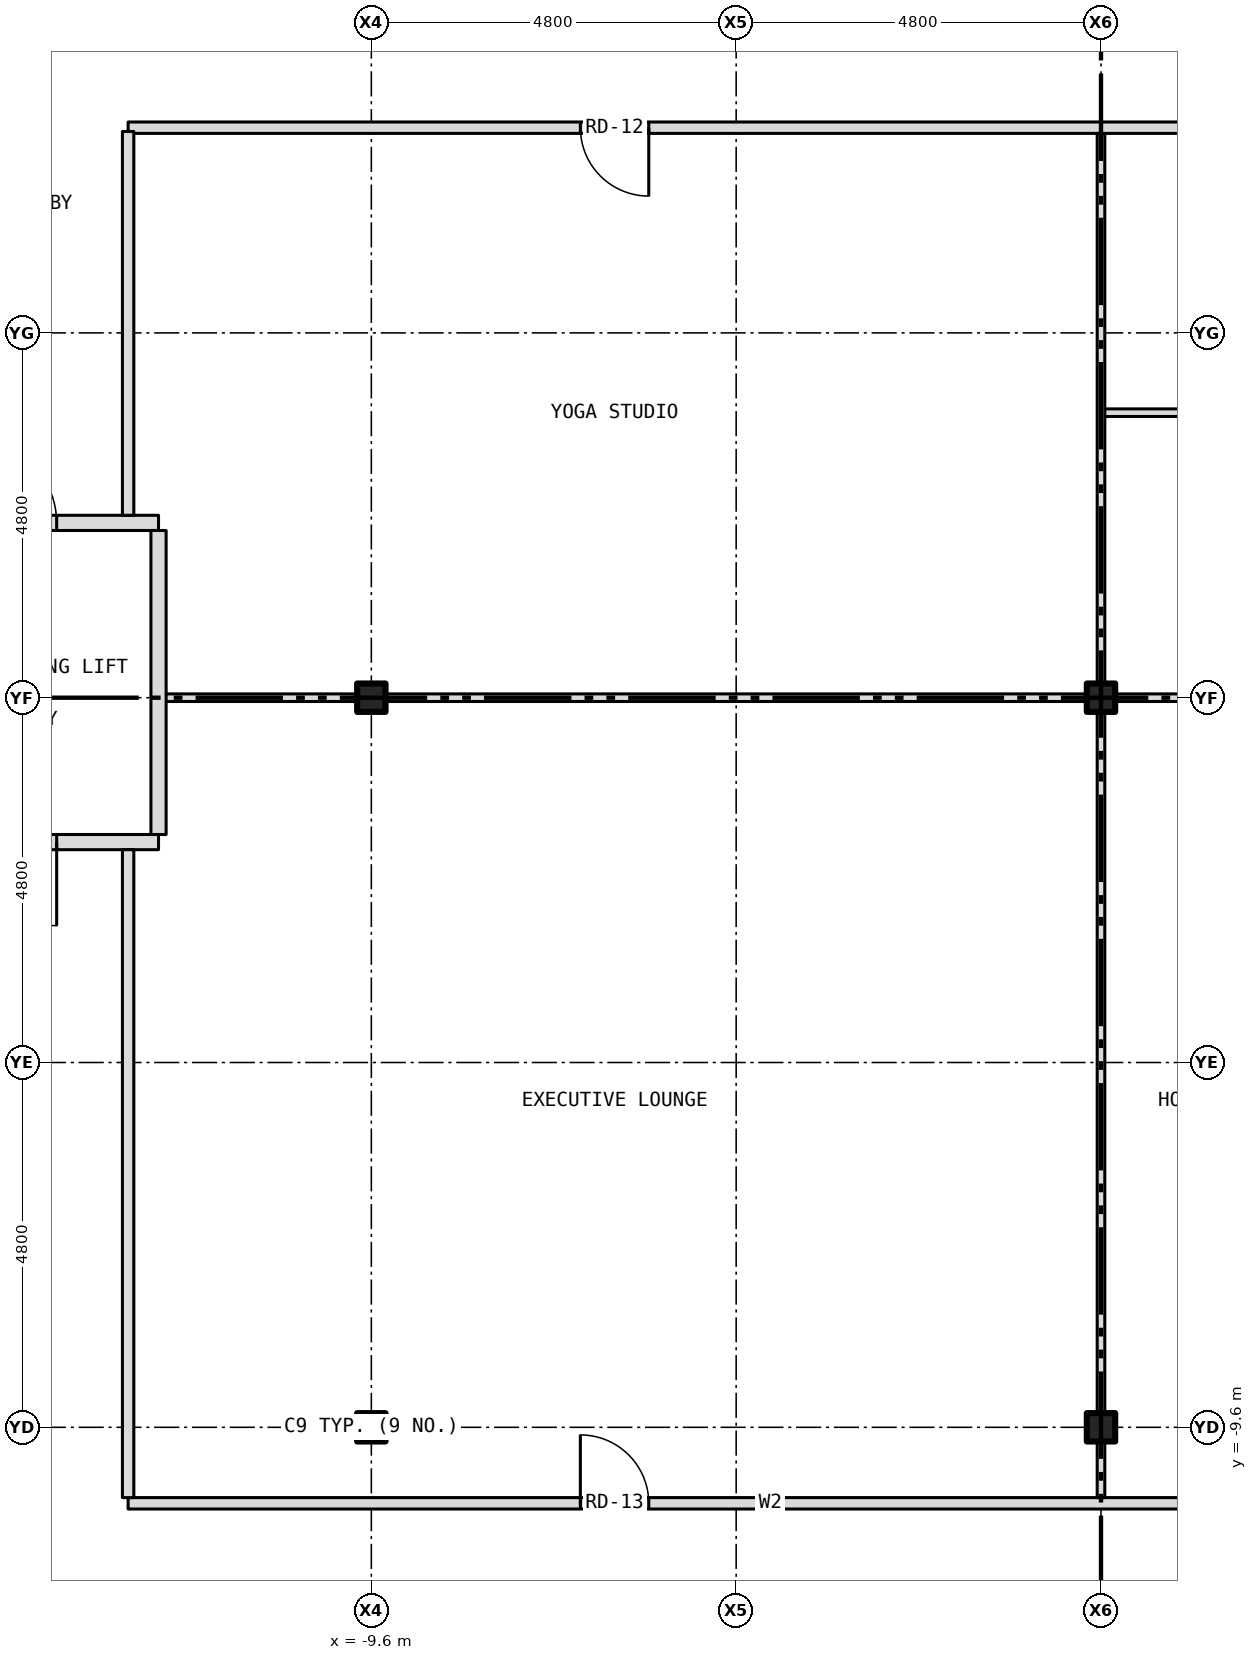
"""IFC4 building model, lengths in metres.
Left out: names, types, materials, properties, quantities, classifications, styles, units other than length and angle.
Written with IfcOpenShell. Run it as: python <this file> out.ifc"""

import sys

from ifc_helpers import new_model, si_unit, direction, frame, frame_2d, origin, origin_2d, place, context, subcontext, project, spatial, rectangle, i_section, extrude, element, fill, save


model = new_model("IFC4")
c1 = context("Model", 3, precision=1e-05, world=origin(), true_north=direction((0.0, 1.0)))
c2 = subcontext(c1, "Body", "Model", "MODEL_VIEW")
j1 = project(units=[si_unit("LENGTHUNIT", "METRE"), si_unit("PLANEANGLEUNIT", "RADIAN")], contexts=[c1])
p1 = place(None, origin())
s1 = spatial("IfcSite", under=j1, at=p1, CompositionType="ELEMENT")
p2 = place(p1, origin())
s2 = spatial("IfcBuilding", under=s1, at=p2, CompositionType="ELEMENT")
p3 = place(p2, frame((0.0, 0.0, 198.0)))
s3 = spatial("IfcBuildingStorey", under=s2, at=p3, CompositionType="ELEMENT", Elevation=198.0)
for number, where, z_axis, x_axis in (
    (1, (-9.6, -9.6, -0.15), (0.0, 0.0, 1.0), (1.0, 0.0, 0.0)),
    (2, (-9.6, 0.0, -0.15), (0.0, 0.0, 1.0), (1.0, 0.0, 0.0)),
    (3, (0.0, -9.6, -0.15), (0.0, 0.0, 1.0), (1.0, 0.0, 0.0)),
    (4, (0.0, 0.0, -0.15), (0.0, 0.0, 1.0), (1.0, 0.0, 0.0)),
):
    element("IfcColumn", number, at=place(p3, frame(where, z_axis=z_axis, x_axis=x_axis)), inside=s3, PredefinedType="COLUMN", context=c2, shape_type="SweptSolid", body=[
        extrude(i_section(OverallWidth=0.373, OverallDepth=0.373, WebThickness=0.016, FlangeThickness=0.026, at=origin_2d()), origin(), (0.0, 0.0, 1.0), 3.5),
    ])
p4 = place(p3, frame((-12.8, -10.6, 0.0), z_axis=(0.0, 0.0, 1.0), x_axis=(1.0, 0.0, 0.0)))
e5 = element("IfcWall", 5, at=p4, inside=s3, PredefinedType="PARTITIONING", context=c2, shape_type="SweptSolid", body=[
    extrude(rectangle(XDim=16.9, YDim=0.15, at=frame_2d((8.45, 0.0))), origin(), (0.0, 0.0, 1.0), 3.35),
])
p5 = place(p4, frame((5.95, 0.0, 0.0)))
e6 = element("IfcOpeningElement", 6, at=p5, cuts=e5, PredefinedType="OPENING", context=c2, shape_type="SweptSolid", body=[
    extrude(rectangle(XDim=0.9, YDim=2.1, at=frame_2d((0.45, 1.05))), frame((0.0, 0.087, 0.0), z_axis=(0.0, -1.0, 0.0), x_axis=(1.0, 0.0, 0.0)), (0.0, 0.0, 1.0), 0.174),
])
p6 = place(p3, frame((-15.68, -1.9, 0.0), z_axis=(0.0, 0.0, 1.0), x_axis=(1.0, 0.0, 0.0)))
e7 = element("IfcWall", 7, at=p6, inside=s3, PredefinedType="PARTITIONING", context=c2, shape_type="SweptSolid", body=[
    extrude(rectangle(XDim=3.28, YDim=0.2, at=frame_2d((1.64, 0.0))), origin(), (0.0, 0.0, 1.0), 3.35),
])
p7 = place(p6, frame((0.84, 0.0, 0.0)))
e8 = element("IfcOpeningElement", 8, at=p7, cuts=e7, PredefinedType="OPENING", context=c2, shape_type="SweptSolid", body=[
    extrude(rectangle(XDim=1.1, YDim=2.1, at=frame_2d((0.55, 1.05))), frame((0.0, 0.112, 0.0), z_axis=(0.0, -1.0, 0.0), x_axis=(1.0, 0.0, 0.0)), (0.0, 0.0, 1.0), 0.224),
])
p8 = place(p3, frame((-12.4, 0.0, 0.0), z_axis=(0.0, 0.0, 1.0), x_axis=(1.0, 0.0, 0.0)))
e9 = element("IfcWall", 9, at=p8, inside=s3, PredefinedType="PARTITIONING", context=c2, shape_type="SweptSolid", body=[
    extrude(rectangle(XDim=2.613, YDim=0.1, at=frame_2d((1.306, 0.0))), origin(), (0.0, 0.0, 1.0), 2.728),
])
p9 = place(p3, frame((-9.787, 0.0, 0.0), z_axis=(0.0, 0.0, 1.0), x_axis=(1.0, 0.0, 0.0)))
e10 = element("IfcWall", 10, at=p9, inside=s3, PredefinedType="PARTITIONING", context=c2, shape_type="SweptSolid", body=[
    extrude(rectangle(XDim=0.374, YDim=0.1, at=frame_2d((0.187, 0.0))), origin(), (0.0, 0.0, 1.0), 3.35),
])
p10 = place(p3, frame((-9.413, 0.0, 0.0), z_axis=(0.0, 0.0, 1.0), x_axis=(1.0, 0.0, 0.0)))
e11 = element("IfcWall", 11, at=p10, inside=s3, PredefinedType="PARTITIONING", context=c2, shape_type="SweptSolid", body=[
    extrude(rectangle(XDim=9.226, YDim=0.1, at=frame_2d((4.613, 0.0))), origin(), (0.0, 0.0, 1.0), 2.728),
])
p11 = place(p3, frame((-0.187, 0.0, 0.0), z_axis=(0.0, 0.0, 1.0), x_axis=(1.0, 0.0, 0.0)))
e12 = element("IfcWall", 12, at=p11, inside=s3, PredefinedType="PARTITIONING", context=c2, shape_type="SweptSolid", body=[
    extrude(rectangle(XDim=0.374, YDim=0.1, at=frame_2d((0.187, 0.0))), origin(), (0.0, 0.0, 1.0), 3.35),
])
p12 = place(p3, frame((0.187, 0.0, 0.0), z_axis=(0.0, 0.0, 1.0), x_axis=(1.0, 0.0, 0.0)))
e13 = element("IfcWall", 13, at=p12, inside=s3, PredefinedType="PARTITIONING", context=c2, shape_type="SweptSolid", body=[
    extrude(rectangle(XDim=3.913, YDim=0.1, at=frame_2d((1.957, 0.0))), origin(), (0.0, 0.0, 1.0), 2.728),
])
p13 = place(p3, frame((-15.68, 2.3, 0.0), z_axis=(0.0, 0.0, 1.0), x_axis=(1.0, 0.0, 0.0)))
e14 = element("IfcWall", 14, at=p13, inside=s3, PredefinedType="PARTITIONING", context=c2, shape_type="SweptSolid", body=[
    extrude(rectangle(XDim=3.28, YDim=0.2, at=frame_2d((1.64, 0.0))), origin(), (0.0, 0.0, 1.0), 3.35),
])
p14 = place(p13, frame((0.84, 0.0, 0.0)))
e15 = element("IfcOpeningElement", 15, at=p14, cuts=e14, PredefinedType="OPENING", context=c2, shape_type="SweptSolid", body=[
    extrude(rectangle(XDim=1.1, YDim=2.1, at=frame_2d((0.55, 1.05))), frame((0.0, 0.112, 0.0), z_axis=(0.0, -1.0, 0.0), x_axis=(1.0, 0.0, 0.0)), (0.0, 0.0, 1.0), 0.224),
])
p15 = place(p3, frame((0.0, 3.75, 0.0), z_axis=(0.0, 0.0, 1.0), x_axis=(1.0, 0.0, 0.0)))
e16 = element("IfcWall", 16, at=p15, inside=s3, PredefinedType="PARTITIONING", context=c2, shape_type="SweptSolid", body=[
    extrude(rectangle(XDim=4.1, YDim=0.1, at=frame_2d((2.05, 0.0))), origin(), (0.0, 0.0, 1.0), 3.35),
])
p16 = place(p3, frame((-12.8, 7.5, 0.0), z_axis=(0.0, 0.0, 1.0), x_axis=(1.0, 0.0, 0.0)))
e17 = element("IfcWall", 17, at=p16, inside=s3, PredefinedType="PARTITIONING", context=c2, shape_type="SweptSolid", body=[
    extrude(rectangle(XDim=16.9, YDim=0.15, at=frame_2d((8.45, 0.0))), origin(), (0.0, 0.0, 1.0), 3.35),
])
p17 = place(p16, frame((14.4, 0.0, 0.0)))
e18 = element("IfcOpeningElement", 18, at=p17, cuts=e17, PredefinedType="OPENING", context=c2, shape_type="SweptSolid", body=[
    extrude(rectangle(XDim=0.9, YDim=2.1, at=frame_2d((0.45, 1.05))), frame((0.0, 0.087, 0.0), z_axis=(0.0, -1.0, 0.0), x_axis=(1.0, 0.0, 0.0)), (0.0, 0.0, 1.0), 0.174),
])
p18 = place(p16, frame((5.95, 0.0, 0.0)))
e19 = element("IfcOpeningElement", 19, at=p18, cuts=e17, PredefinedType="OPENING", context=c2, shape_type="SweptSolid", body=[
    extrude(rectangle(XDim=0.9, YDim=2.1, at=frame_2d((0.45, 1.05))), frame((0.0, 0.087, 0.0), z_axis=(0.0, -1.0, 0.0), x_axis=(1.0, 0.0, 0.0)), (0.0, 0.0, 1.0), 0.174),
])
p19 = place(p3, frame((-12.8, -10.525, 0.0), z_axis=(0.0, 0.0, 1.0), x_axis=(0.0, 1.0, 0.0)))
e20 = element("IfcWall", 20, at=p19, inside=s3, PredefinedType="PARTITIONING", context=c2, shape_type="SweptSolid", body=[
    extrude(rectangle(XDim=8.525, YDim=0.15, at=frame_2d((4.262, 0.0))), origin(), (0.0, 0.0, 1.0), 3.35),
])
p20 = place(p3, frame((-12.8, 2.4, 0.0), z_axis=(0.0, 0.0, 1.0), x_axis=(0.0, 1.0, 0.0)))
e21 = element("IfcWall", 21, at=p20, inside=s3, PredefinedType="PARTITIONING", context=c2, shape_type="SweptSolid", body=[
    extrude(rectangle(XDim=5.05, YDim=0.15, at=frame_2d((2.525, 0.0))), origin(), (0.0, 0.0, 1.0), 3.35),
])
p21 = place(p3, frame((-12.4, -1.8, 0.0), z_axis=(0.0, 0.0, 1.0), x_axis=(0.0, 1.0, 0.0)))
e22 = element("IfcWall", 22, at=p21, inside=s3, PredefinedType="PARTITIONING", context=c2, shape_type="SweptSolid", body=[
    extrude(rectangle(XDim=4.0, YDim=0.2, at=frame_2d((2.0, 0.0))), origin(), (0.0, 0.0, 1.0), 3.35),
])
p22 = place(p3, frame((0.0, -10.525, 0.0), z_axis=(0.0, 0.0, 1.0), x_axis=(0.0, 1.0, 0.0)))
e23 = element("IfcWall", 23, at=p22, inside=s3, PredefinedType="PARTITIONING", context=c2, shape_type="SweptSolid", body=[
    extrude(rectangle(XDim=0.738, YDim=0.1, at=frame_2d((0.369, 0.0))), origin(), (0.0, 0.0, 1.0), 2.728),
])
p23 = place(p3, frame((0.0, -9.787, 0.0), z_axis=(0.0, 0.0, 1.0), x_axis=(0.0, 1.0, 0.0)))
e24 = element("IfcWall", 24, at=p23, inside=s3, PredefinedType="PARTITIONING", context=c2, shape_type="SweptSolid", body=[
    extrude(rectangle(XDim=0.374, YDim=0.1, at=frame_2d((0.187, 0.0))), origin(), (0.0, 0.0, 1.0), 3.35),
])
p24 = place(p3, frame((0.0, -9.413, 0.0), z_axis=(0.0, 0.0, 1.0), x_axis=(0.0, 1.0, 0.0)))
e25 = element("IfcWall", 25, at=p24, inside=s3, PredefinedType="PARTITIONING", context=c2, shape_type="SweptSolid", body=[
    extrude(rectangle(XDim=9.363, YDim=0.1, at=frame_2d((4.682, 0.0))), origin(), (0.0, 0.0, 1.0), 2.728),
])
p25 = place(p3, frame((0.0, 0.05, 0.0), z_axis=(0.0, 0.0, 1.0), x_axis=(0.0, 1.0, 0.0)))
e26 = element("IfcWall", 26, at=p25, inside=s3, PredefinedType="PARTITIONING", context=c2, shape_type="SweptSolid", body=[
    extrude(rectangle(XDim=7.375, YDim=0.1, at=frame_2d((3.688, 0.0))), origin(), (0.0, 0.0, 1.0), 2.728),
])
p26 = place(p14, origin())
e27 = element("IfcDoor", 27, at=p26, inside=s3, OperationType="SINGLE_SWING_LEFT", PredefinedType="DOOR", context=c2, shape_type="SweptSolid", body=[
    extrude(rectangle(XDim=1.1, YDim=2.1, at=frame_2d((0.55, 1.05))), frame((0.0, 0.025, 0.0), z_axis=(0.0, -1.0, 0.0), x_axis=(1.0, 0.0, 0.0)), (0.0, 0.0, 1.0), 0.05),
])
fill(e15, e27)
p27 = place(p7, origin())
e28 = element("IfcDoor", 28, at=p27, inside=s3, OperationType="SINGLE_SWING_RIGHT", PredefinedType="DOOR", context=c2, shape_type="SweptSolid", body=[
    extrude(rectangle(XDim=1.1, YDim=2.1, at=frame_2d((0.55, 1.05))), frame((0.0, 0.025, 0.0), z_axis=(0.0, -1.0, 0.0), x_axis=(1.0, 0.0, 0.0)), (0.0, 0.0, 1.0), 0.05),
])
fill(e8, e28)
p28 = place(p18, origin())
e29 = element("IfcDoor", 29, at=p28, inside=s3, OperationType="SINGLE_SWING_RIGHT", PredefinedType="DOOR", context=c2, shape_type="SweptSolid", body=[
    extrude(rectangle(XDim=0.9, YDim=2.1, at=frame_2d((0.45, 1.05))), frame((0.0, 0.025, 0.0), z_axis=(0.0, -1.0, 0.0), x_axis=(1.0, 0.0, 0.0)), (0.0, 0.0, 1.0), 0.05),
])
fill(e19, e29)
p29 = place(p5, origin())
e30 = element("IfcDoor", 30, at=p29, inside=s3, OperationType="SINGLE_SWING_LEFT", PredefinedType="DOOR", context=c2, shape_type="SweptSolid", body=[
    extrude(rectangle(XDim=0.9, YDim=2.1, at=frame_2d((0.45, 1.05))), frame((0.0, 0.025, 0.0), z_axis=(0.0, -1.0, 0.0), x_axis=(1.0, 0.0, 0.0)), (0.0, 0.0, 1.0), 0.05),
])
fill(e6, e30)
save(model, sys.argv[1])
